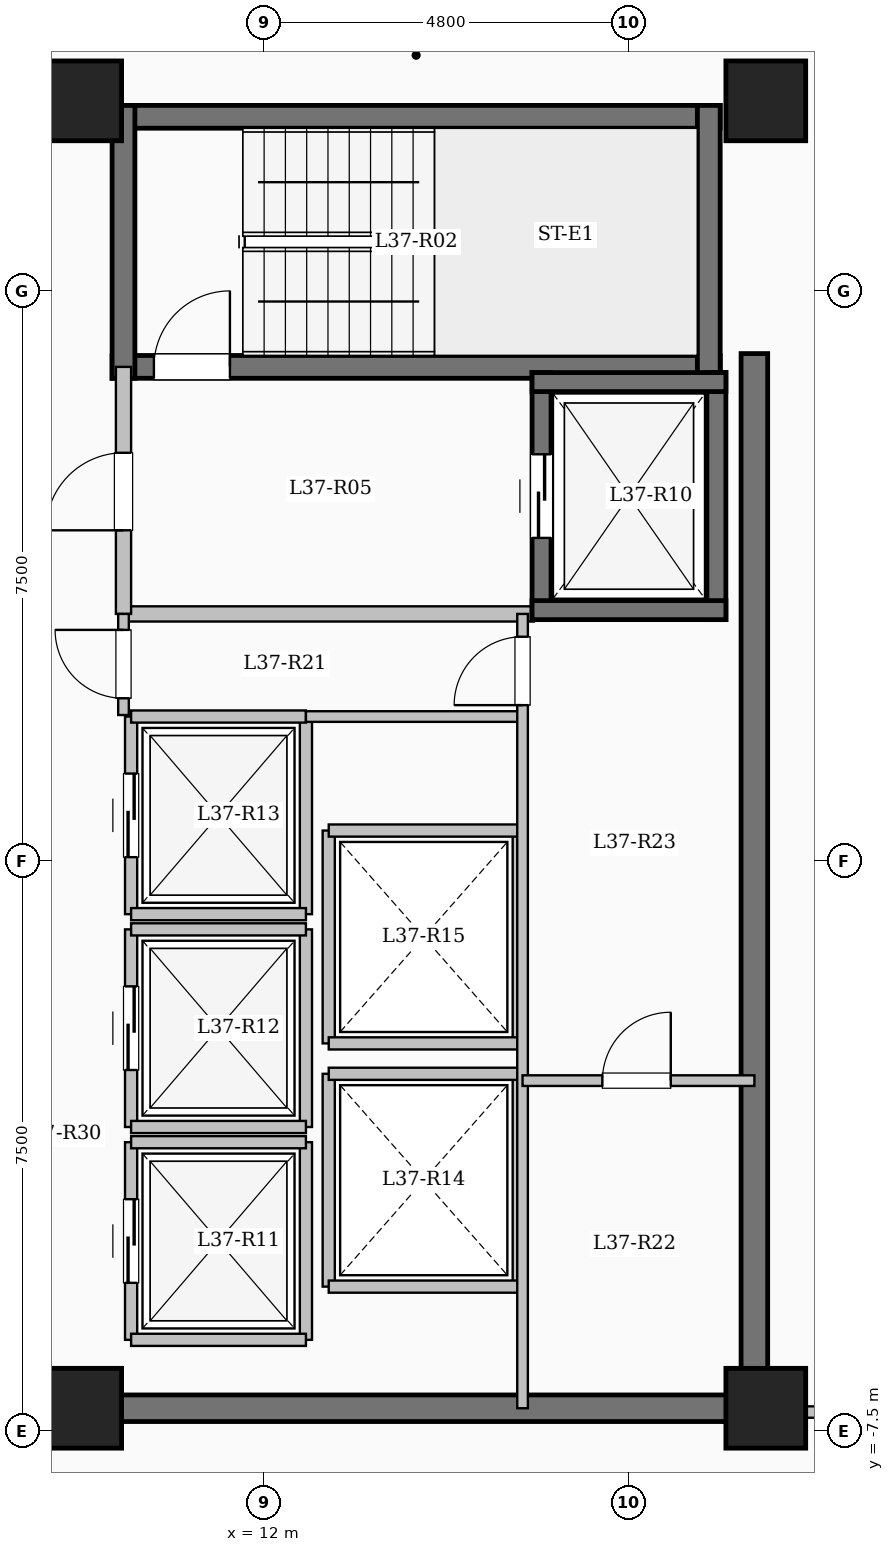
"""IFC4 building model, lengths in metres.
Left out: names, types, materials, properties, quantities, classifications, styles, units other than length and angle.
Written with IfcOpenShell. Run it as: python <this file> out.ifc"""

import sys

from ifc_helpers import new_model, si_unit, direction, frame, frame_2d, origin, origin_2d, place, context, subcontext, project, spatial, rectangle, extrude, element, fill, save


model = new_model("IFC4")
c1 = context("Model", 3, precision=1e-05, world=origin(), true_north=direction((0.0, 1.0)))
c2 = subcontext(c1, "Body", "Model", "MODEL_VIEW")
j1 = project(units=[si_unit("LENGTHUNIT", "METRE"), si_unit("PLANEANGLEUNIT", "RADIAN")], contexts=[c1])
p1 = place(None, origin())
s1 = spatial("IfcSite", under=j1, at=p1, CompositionType="ELEMENT")
p2 = place(p1, origin())
s2 = spatial("IfcBuilding", under=s1, at=p2, CompositionType="ELEMENT")
p3 = place(p2, frame((0.0, 0.0, 139.3)))
s3 = spatial("IfcBuildingStorey", under=s2, at=p3, CompositionType="ELEMENT", Elevation=139.3)
for number, where, z_axis, x_axis in (
    (1, (9.6, -7.2, 0.0), (0.0, 0.0, 1.0), (1.0, 0.0, 0.0)),
    (2, (9.6, 10.0, 0.0), (0.0, 0.0, 1.0), (1.0, 0.0, 0.0)),
    (3, (18.6, -7.2, 0.0), (0.0, 0.0, 1.0), (1.0, 0.0, 0.0)),
    (4, (18.6, 10.0, 0.0), (0.0, 0.0, 1.0), (1.0, 0.0, 0.0)),
):
    element("IfcColumn", number, at=place(p3, frame(where, z_axis=z_axis, x_axis=x_axis)), inside=s3, PredefinedType="COLUMN", context=c2, shape_type="SweptSolid", body=[
        extrude(rectangle(XDim=1.05, YDim=1.05, at=origin_2d()), origin(), (0.0, 0.0, 1.0), 3.35),
    ])
p4 = place(p3, frame((10.0, 9.79, 0.0), z_axis=(0.0, 0.0, 1.0), x_axis=(1.0, 0.0, 0.0)))
e5 = element("IfcWall", 5, at=p4, inside=s3, PredefinedType="SHEAR", context=c2, shape_type="SweptSolid", body=[
    extrude(rectangle(XDim=8.0, YDim=0.3, at=frame_2d((4.0, 0.0))), origin(), (0.0, 0.0, 1.0), 3.35),
])
p5 = place(p3, frame((10.0, 6.5, 0.0), z_axis=(0.0, 0.0, 1.0), x_axis=(1.0, 0.0, 0.0)))
e6 = element("IfcWall", 6, at=p5, inside=s3, PredefinedType="SHEAR", context=c2, shape_type="SweptSolid", body=[
    extrude(rectangle(XDim=8.0, YDim=0.3, at=frame_2d((4.0, 0.0))), origin(), (0.0, 0.0, 1.0), 3.35),
])
p6 = place(p5, frame((0.55, 0.0, 0.0)))
e7 = element("IfcOpeningElement", 7, at=p6, cuts=e6, PredefinedType="OPENING", context=c2, shape_type="SweptSolid", body=[
    extrude(rectangle(XDim=1.0, YDim=2.15, at=frame_2d((0.5, 1.075))), frame((0.0, 0.16, 0.0), z_axis=(0.0, -1.0, 0.0), x_axis=(1.0, 0.0, 0.0)), (0.0, 0.0, 1.0), 0.32),
])
for number, where, z_axis, x_axis in (
    (8, (10.15, 6.35, 0.0), (0.0, 0.0, 1.0), (0.0, 1.0, 0.0)),
    (9, (17.85, 6.35, 0.0), (0.0, 0.0, 1.0), (0.0, 1.0, 0.0)),
):
    element("IfcWall", number, at=place(p3, frame(where, z_axis=z_axis, x_axis=x_axis)), inside=s3, PredefinedType="SHEAR", context=c2, shape_type="SweptSolid", body=[
        extrude(rectangle(XDim=3.59, YDim=0.3, at=frame_2d((1.795, 0.0))), origin(), (0.0, 0.0, 1.0), 3.35),
    ])
p7 = place(p3, frame((10.15, 3.25, 0.0), z_axis=(0.0, 0.0, 1.0), x_axis=(1.0, 0.0, 0.0)))
e10 = element("IfcWall", 10, at=p7, inside=s3, PredefinedType="SOLIDWALL", context=c2, shape_type="SweptSolid", body=[
    extrude(rectangle(XDim=5.4, YDim=0.2, at=frame_2d((2.7, 0.0))), origin(), (0.0, 0.0, 1.0), 3.1),
])
p8 = place(p3, frame((10.15, 3.25, 0.0), z_axis=(0.0, 0.0, 1.0), x_axis=(0.0, 1.0, 0.0)))
e11 = element("IfcWall", 11, at=p8, inside=s3, PredefinedType="SOLIDWALL", context=c2, shape_type="SweptSolid", body=[
    extrude(rectangle(XDim=3.25, YDim=0.2, at=frame_2d((1.625, 0.0))), origin(), (0.0, 0.0, 1.0), 3.1),
])
p9 = place(p8, frame((1.1, 0.0, 0.0)))
e12 = element("IfcOpeningElement", 12, at=p9, cuts=e11, PredefinedType="OPENING", context=c2, shape_type="SweptSolid", body=[
    extrude(rectangle(XDim=1.02, YDim=2.15, at=frame_2d((0.51, 1.075))), frame((0.0, 0.11, 0.0), z_axis=(0.0, -1.0, 0.0), x_axis=(1.0, 0.0, 0.0)), (0.0, 0.0, 1.0), 0.22),
])
p10 = place(p3, frame((15.65, 3.175, 0.0), z_axis=(0.0, 0.0, 1.0), x_axis=(0.0, 1.0, 0.0)))
e13 = element("IfcWall", 13, at=p10, inside=s3, PredefinedType="SHEAR", context=c2, shape_type="SweptSolid", body=[
    extrude(rectangle(XDim=3.25, YDim=0.25, at=frame_2d((1.625, 0.0))), origin(), (0.0, 0.0, 1.0), 3.35),
])
p11 = place(p10, frame((1.075, 0.0, 0.0)))
e14 = element("IfcOpeningElement", 14, at=p11, cuts=e13, PredefinedType="OPENING", context=c2, shape_type="SweptSolid", body=[
    extrude(rectangle(XDim=1.1, YDim=2.15, at=frame_2d((0.55, 1.075))), frame((0.0, 0.135, 0.0), z_axis=(0.0, -1.0, 0.0), x_axis=(1.0, 0.0, 0.0)), (0.0, 0.0, 1.0), 0.27),
])
p12 = place(p3, frame((17.95, 3.175, 0.0), z_axis=(0.0, 0.0, 1.0), x_axis=(0.0, 1.0, 0.0)))
e15 = element("IfcWall", 15, at=p12, inside=s3, PredefinedType="SHEAR", context=c2, shape_type="SweptSolid", body=[
    extrude(rectangle(XDim=3.25, YDim=0.25, at=frame_2d((1.625, 0.0))), origin(), (0.0, 0.0, 1.0), 3.35),
])
for number, where, z_axis, x_axis in (
    (16, (15.525, 3.3, 0.0), (0.0, 0.0, 1.0), (1.0, 0.0, 0.0)),
    (17, (15.525, 6.3, 0.0), (0.0, 0.0, 1.0), (1.0, 0.0, 0.0)),
):
    element("IfcWall", number, at=place(p3, frame(where, z_axis=z_axis, x_axis=x_axis)), inside=s3, PredefinedType="SHEAR", context=c2, shape_type="SweptSolid", body=[
        extrude(rectangle(XDim=2.55, YDim=0.25, at=frame_2d((1.275, 0.0))), origin(), (0.0, 0.0, 1.0), 3.35),
    ])
p13 = place(p3, frame((10.25, -6.3, 0.0), z_axis=(0.0, 0.0, 1.0), x_axis=(0.0, 1.0, 0.0)))
e18 = element("IfcWall", 18, at=p13, inside=s3, PredefinedType="SOLIDWALL", context=c2, shape_type="SweptSolid", body=[
    extrude(rectangle(XDim=2.6, YDim=0.16, at=frame_2d((1.3, 0.0))), origin(), (0.0, 0.0, 1.0), 3.1),
])
p14 = place(p13, frame((0.75, 0.0, 0.0)))
e19 = element("IfcOpeningElement", 19, at=p14, cuts=e18, PredefinedType="OPENING", context=c2, shape_type="SweptSolid", body=[
    extrude(rectangle(XDim=1.1, YDim=2.15, at=frame_2d((0.55, 1.075))), frame((0.0, 0.09, 0.0), z_axis=(0.0, -1.0, 0.0), x_axis=(1.0, 0.0, 0.0)), (0.0, 0.0, 1.0), 0.18),
])
p15 = place(p3, frame((12.55, -6.3, 0.0), z_axis=(0.0, 0.0, 1.0), x_axis=(0.0, 1.0, 0.0)))
e20 = element("IfcWall", 20, at=p15, inside=s3, PredefinedType="SOLIDWALL", context=c2, shape_type="SweptSolid", body=[
    extrude(rectangle(XDim=2.6, YDim=0.16, at=frame_2d((1.3, 0.0))), origin(), (0.0, 0.0, 1.0), 3.1),
])
for number, where, z_axis, x_axis in (
    (21, (10.25, -6.3, 0.0), (0.0, 0.0, 1.0), (1.0, 0.0, 0.0)),
    (22, (10.25, -3.7, 0.0), (0.0, 0.0, 1.0), (1.0, 0.0, 0.0)),
):
    element("IfcWall", number, at=place(p3, frame(where, z_axis=z_axis, x_axis=x_axis)), inside=s3, PredefinedType="SOLIDWALL", context=c2, shape_type="SweptSolid", body=[
        extrude(rectangle(XDim=2.3, YDim=0.16, at=frame_2d((1.15, 0.0))), origin(), (0.0, 0.0, 1.0), 3.1),
    ])
p16 = place(p3, frame((10.25, -3.5, 0.0), z_axis=(0.0, 0.0, 1.0), x_axis=(0.0, 1.0, 0.0)))
e23 = element("IfcWall", 23, at=p16, inside=s3, PredefinedType="SOLIDWALL", context=c2, shape_type="SweptSolid", body=[
    extrude(rectangle(XDim=2.6, YDim=0.16, at=frame_2d((1.3, 0.0))), origin(), (0.0, 0.0, 1.0), 3.1),
])
p17 = place(p16, frame((0.75, 0.0, 0.0)))
e24 = element("IfcOpeningElement", 24, at=p17, cuts=e23, PredefinedType="OPENING", context=c2, shape_type="SweptSolid", body=[
    extrude(rectangle(XDim=1.1, YDim=2.15, at=frame_2d((0.55, 1.075))), frame((0.0, 0.09, 0.0), z_axis=(0.0, -1.0, 0.0), x_axis=(1.0, 0.0, 0.0)), (0.0, 0.0, 1.0), 0.18),
])
p18 = place(p3, frame((12.55, -3.5, 0.0), z_axis=(0.0, 0.0, 1.0), x_axis=(0.0, 1.0, 0.0)))
e25 = element("IfcWall", 25, at=p18, inside=s3, PredefinedType="SOLIDWALL", context=c2, shape_type="SweptSolid", body=[
    extrude(rectangle(XDim=2.6, YDim=0.16, at=frame_2d((1.3, 0.0))), origin(), (0.0, 0.0, 1.0), 3.1),
])
for number, where, z_axis, x_axis in (
    (26, (10.25, -3.5, 0.0), (0.0, 0.0, 1.0), (1.0, 0.0, 0.0)),
    (27, (10.25, -0.9, 0.0), (0.0, 0.0, 1.0), (1.0, 0.0, 0.0)),
):
    element("IfcWall", number, at=place(p3, frame(where, z_axis=z_axis, x_axis=x_axis)), inside=s3, PredefinedType="SOLIDWALL", context=c2, shape_type="SweptSolid", body=[
        extrude(rectangle(XDim=2.3, YDim=0.16, at=frame_2d((1.15, 0.0))), origin(), (0.0, 0.0, 1.0), 3.1),
    ])
p19 = place(p3, frame((10.25, -0.7, 0.0), z_axis=(0.0, 0.0, 1.0), x_axis=(0.0, 1.0, 0.0)))
e28 = element("IfcWall", 28, at=p19, inside=s3, PredefinedType="SOLIDWALL", context=c2, shape_type="SweptSolid", body=[
    extrude(rectangle(XDim=2.6, YDim=0.16, at=frame_2d((1.3, 0.0))), origin(), (0.0, 0.0, 1.0), 3.1),
])
p20 = place(p19, frame((0.75, 0.0, 0.0)))
e29 = element("IfcOpeningElement", 29, at=p20, cuts=e28, PredefinedType="OPENING", context=c2, shape_type="SweptSolid", body=[
    extrude(rectangle(XDim=1.1, YDim=2.15, at=frame_2d((0.55, 1.075))), frame((0.0, 0.09, 0.0), z_axis=(0.0, -1.0, 0.0), x_axis=(1.0, 0.0, 0.0)), (0.0, 0.0, 1.0), 0.18),
])
p21 = place(p3, frame((12.55, -0.7, 0.0), z_axis=(0.0, 0.0, 1.0), x_axis=(0.0, 1.0, 0.0)))
e30 = element("IfcWall", 30, at=p21, inside=s3, PredefinedType="SOLIDWALL", context=c2, shape_type="SweptSolid", body=[
    extrude(rectangle(XDim=2.6, YDim=0.16, at=frame_2d((1.3, 0.0))), origin(), (0.0, 0.0, 1.0), 3.1),
])
for number, where, z_axis, x_axis in (
    (31, (10.25, -0.7, 0.0), (0.0, 0.0, 1.0), (1.0, 0.0, 0.0)),
    (32, (10.25, 1.9, 0.0), (0.0, 0.0, 1.0), (1.0, 0.0, 0.0)),
):
    element("IfcWall", number, at=place(p3, frame(where, z_axis=z_axis, x_axis=x_axis)), inside=s3, PredefinedType="SOLIDWALL", context=c2, shape_type="SweptSolid", body=[
        extrude(rectangle(XDim=2.3, YDim=0.16, at=frame_2d((1.15, 0.0))), origin(), (0.0, 0.0, 1.0), 3.1),
    ])
for number, where, z_axis, x_axis in (
    (33, (12.85, -5.6, 0.0), (0.0, 0.0, 1.0), (0.0, 1.0, 0.0)),
    (34, (15.35, -5.6, 0.0), (0.0, 0.0, 1.0), (0.0, 1.0, 0.0)),
):
    element("IfcWall", number, at=place(p3, frame(where, z_axis=z_axis, x_axis=x_axis)), inside=s3, PredefinedType="SOLIDWALL", context=c2, shape_type="SweptSolid", body=[
        extrude(rectangle(XDim=2.8, YDim=0.16, at=frame_2d((1.4, 0.0))), origin(), (0.0, 0.0, 1.0), 3.1),
    ])
for number, where, z_axis, x_axis in (
    (35, (12.85, -5.6, 0.0), (0.0, 0.0, 1.0), (1.0, 0.0, 0.0)),
    (36, (12.85, -2.8, 0.0), (0.0, 0.0, 1.0), (1.0, 0.0, 0.0)),
):
    element("IfcWall", number, at=place(p3, frame(where, z_axis=z_axis, x_axis=x_axis)), inside=s3, PredefinedType="SOLIDWALL", context=c2, shape_type="SweptSolid", body=[
        extrude(rectangle(XDim=2.5, YDim=0.16, at=frame_2d((1.25, 0.0))), origin(), (0.0, 0.0, 1.0), 3.1),
    ])
for number, where, z_axis, x_axis in (
    (37, (12.85, -2.4, 0.0), (0.0, 0.0, 1.0), (0.0, 1.0, 0.0)),
    (38, (15.35, -2.4, 0.0), (0.0, 0.0, 1.0), (0.0, 1.0, 0.0)),
):
    element("IfcWall", number, at=place(p3, frame(where, z_axis=z_axis, x_axis=x_axis)), inside=s3, PredefinedType="SOLIDWALL", context=c2, shape_type="SweptSolid", body=[
        extrude(rectangle(XDim=2.8, YDim=0.16, at=frame_2d((1.4, 0.0))), origin(), (0.0, 0.0, 1.0), 3.1),
    ])
for number, where, z_axis, x_axis in (
    (39, (12.85, -2.4, 0.0), (0.0, 0.0, 1.0), (1.0, 0.0, 0.0)),
    (40, (12.85, 0.4, 0.0), (0.0, 0.0, 1.0), (1.0, 0.0, 0.0)),
):
    element("IfcWall", number, at=place(p3, frame(where, z_axis=z_axis, x_axis=x_axis)), inside=s3, PredefinedType="SOLIDWALL", context=c2, shape_type="SweptSolid", body=[
        extrude(rectangle(XDim=2.5, YDim=0.16, at=frame_2d((1.25, 0.0))), origin(), (0.0, 0.0, 1.0), 3.1),
    ])
p22 = place(p3, frame((18.45, -7.375, 0.0), z_axis=(0.0, 0.0, 1.0), x_axis=(0.0, 1.0, 0.0)))
e41 = element("IfcWall", 41, at=p22, inside=s3, PredefinedType="SHEAR", context=c2, shape_type="SweptSolid", body=[
    extrude(rectangle(XDim=14.05, YDim=0.35, at=frame_2d((7.025, 0.0))), origin(), (0.0, 0.0, 1.0), 3.35),
])
p23 = place(p3, frame((10.075, -7.2, 0.0), z_axis=(0.0, 0.0, 1.0), x_axis=(1.0, 0.0, 0.0)))
e42 = element("IfcWall", 42, at=p23, inside=s3, PredefinedType="SHEAR", context=c2, shape_type="SweptSolid", body=[
    extrude(rectangle(XDim=8.55, YDim=0.35, at=frame_2d((4.275, 0.0))), origin(), (0.0, 0.0, 1.0), 3.35),
])
p24 = place(p3, frame((12.55, 1.9, 0.0), z_axis=(0.0, 0.0, 1.0), x_axis=(1.0, 0.0, 0.0)))
e43 = element("IfcWall", 43, at=p24, inside=s3, PredefinedType="PARTITIONING", context=c2, shape_type="SweptSolid", body=[
    extrude(rectangle(XDim=2.85, YDim=0.14, at=frame_2d((1.425, 0.0))), origin(), (0.0, 0.0, 1.0), 3.1),
])
p25 = place(p3, frame((10.15, 1.92, 0.0), z_axis=(0.0, 0.0, 1.0), x_axis=(0.0, 1.0, 0.0)))
e44 = element("IfcWall", 44, at=p25, inside=s3, PredefinedType="PARTITIONING", context=c2, shape_type="SweptSolid", body=[
    extrude(rectangle(XDim=1.33, YDim=0.14, at=frame_2d((0.665, 0.0))), origin(), (0.0, 0.0, 1.0), 3.1),
])
p26 = place(p25, frame((0.22, 0.0, 0.0)))
e45 = element("IfcOpeningElement", 45, at=p26, cuts=e44, PredefinedType="OPENING", context=c2, shape_type="SweptSolid", body=[
    extrude(rectangle(XDim=0.9, YDim=2.08, at=frame_2d((0.45, 1.04))), frame((0.0, 0.08, 0.0), z_axis=(0.0, -1.0, 0.0), x_axis=(1.0, 0.0, 0.0)), (0.0, 0.0, 1.0), 0.16),
])
p27 = place(p3, frame((15.4, -7.2, 0.0), z_axis=(0.0, 0.0, 1.0), x_axis=(0.0, 1.0, 0.0)))
e46 = element("IfcWall", 46, at=p27, inside=s3, PredefinedType="PARTITIONING", context=c2, shape_type="SweptSolid", body=[
    extrude(rectangle(XDim=10.45, YDim=0.14, at=frame_2d((5.225, 0.0))), origin(), (0.0, 0.0, 1.0), 3.1),
])
p28 = place(p27, frame((9.25, 0.0, 0.0)))
e47 = element("IfcOpeningElement", 47, at=p28, cuts=e46, PredefinedType="OPENING", context=c2, shape_type="SweptSolid", body=[
    extrude(rectangle(XDim=0.9, YDim=2.08, at=frame_2d((0.45, 1.04))), frame((0.0, 0.08, 0.0), z_axis=(0.0, -1.0, 0.0), x_axis=(1.0, 0.0, 0.0)), (0.0, 0.0, 1.0), 0.16),
])
p29 = place(p3, frame((15.4, -2.89, 0.0), z_axis=(0.0, 0.0, 1.0), x_axis=(1.0, 0.0, 0.0)))
e48 = element("IfcWall", 48, at=p29, inside=s3, PredefinedType="PARTITIONING", context=c2, shape_type="SweptSolid", body=[
    extrude(rectangle(XDim=3.05, YDim=0.14, at=frame_2d((1.525, 0.0))), origin(), (0.0, 0.0, 1.0), 3.1),
])
p30 = place(p29, frame((1.05, 0.0, 0.0)))
e49 = element("IfcOpeningElement", 49, at=p30, cuts=e48, PredefinedType="OPENING", context=c2, shape_type="SweptSolid", body=[
    extrude(rectangle(XDim=0.9, YDim=2.08, at=frame_2d((0.45, 1.04))), frame((0.0, 0.08, 0.0), z_axis=(0.0, -1.0, 0.0), x_axis=(1.0, 0.0, 0.0)), (0.0, 0.0, 1.0), 0.16),
])
p31 = place(p3, frame((18.45, -7.25, 0.0), z_axis=(0.0, 0.0, 1.0), x_axis=(1.0, 0.0, 0.0)))
e50 = element("IfcWall", 50, at=p31, inside=s3, PredefinedType="PARTITIONING", context=c2, shape_type="SweptSolid", body=[
    extrude(rectangle(XDim=6.63, YDim=0.15, at=frame_2d((3.315, 0.0))), origin(), (0.0, 0.0, 1.0), 3.1),
])
p32 = place(p31, frame((1.95, 0.0, 0.0)))
e51 = element("IfcOpeningElement", 51, at=p32, cuts=e50, PredefinedType="OPENING", context=c2, shape_type="SweptSolid", body=[
    extrude(rectangle(XDim=1.08, YDim=2.15, at=frame_2d((0.54, 1.075))), frame((0.0, 0.085, 0.0), z_axis=(0.0, -1.0, 0.0), x_axis=(1.0, 0.0, 0.0)), (0.0, 0.0, 1.0), 0.17),
])
p33 = place(p6, origin())
e52 = element("IfcDoor", 52, at=p33, inside=s3, OperationType="SINGLE_SWING_RIGHT", PredefinedType="DOOR", context=c2, shape_type="SweptSolid", body=[
    extrude(rectangle(XDim=1.0, YDim=2.15, at=frame_2d((0.5, 1.075))), frame((0.0, 0.025, 0.0), z_axis=(0.0, -1.0, 0.0), x_axis=(1.0, 0.0, 0.0)), (0.0, 0.0, 1.0), 0.05),
])
fill(e7, e52)
p34 = place(p9, origin())
e53 = element("IfcDoor", 53, at=p34, inside=s3, OperationType="SINGLE_SWING_LEFT", PredefinedType="DOOR", context=c2, shape_type="SweptSolid", body=[
    extrude(rectangle(XDim=1.02, YDim=2.15, at=frame_2d((0.51, 1.075))), frame((0.0, 0.025, 0.0), z_axis=(0.0, -1.0, 0.0), x_axis=(1.0, 0.0, 0.0)), (0.0, 0.0, 1.0), 0.05),
])
fill(e12, e53)
p35 = place(p11, origin())
e54 = element("IfcDoor", 54, at=p35, inside=s3, OperationType="SLIDING_TO_LEFT", PredefinedType="DOOR", context=c2, shape_type="SweptSolid", body=[
    extrude(rectangle(XDim=1.1, YDim=2.15, at=frame_2d((0.55, 1.075))), frame((0.0, 0.025, 0.0), z_axis=(0.0, -1.0, 0.0), x_axis=(1.0, 0.0, 0.0)), (0.0, 0.0, 1.0), 0.05),
])
fill(e14, e54)
p36 = place(p14, origin())
e55 = element("IfcDoor", 55, at=p36, inside=s3, OperationType="SLIDING_TO_LEFT", PredefinedType="DOOR", context=c2, shape_type="SweptSolid", body=[
    extrude(rectangle(XDim=1.1, YDim=2.15, at=frame_2d((0.55, 1.075))), frame((0.0, 0.025, 0.0), z_axis=(0.0, -1.0, 0.0), x_axis=(1.0, 0.0, 0.0)), (0.0, 0.0, 1.0), 0.05),
])
fill(e19, e55)
p37 = place(p17, origin())
e56 = element("IfcDoor", 56, at=p37, inside=s3, OperationType="SLIDING_TO_LEFT", PredefinedType="DOOR", context=c2, shape_type="SweptSolid", body=[
    extrude(rectangle(XDim=1.1, YDim=2.15, at=frame_2d((0.55, 1.075))), frame((0.0, 0.025, 0.0), z_axis=(0.0, -1.0, 0.0), x_axis=(1.0, 0.0, 0.0)), (0.0, 0.0, 1.0), 0.05),
])
fill(e24, e56)
p38 = place(p20, origin())
e57 = element("IfcDoor", 57, at=p38, inside=s3, OperationType="SLIDING_TO_LEFT", PredefinedType="DOOR", context=c2, shape_type="SweptSolid", body=[
    extrude(rectangle(XDim=1.1, YDim=2.15, at=frame_2d((0.55, 1.075))), frame((0.0, 0.025, 0.0), z_axis=(0.0, -1.0, 0.0), x_axis=(1.0, 0.0, 0.0)), (0.0, 0.0, 1.0), 0.05),
])
fill(e29, e57)
p39 = place(p26, origin())
e58 = element("IfcDoor", 58, at=p39, inside=s3, OperationType="SINGLE_SWING_RIGHT", PredefinedType="DOOR", context=c2, shape_type="SweptSolid", body=[
    extrude(rectangle(XDim=0.9, YDim=2.08, at=frame_2d((0.45, 1.04))), frame((0.0, 0.025, 0.0), z_axis=(0.0, -1.0, 0.0), x_axis=(1.0, 0.0, 0.0)), (0.0, 0.0, 1.0), 0.05),
])
fill(e45, e58)
p40 = place(p28, origin())
e59 = element("IfcDoor", 59, at=p40, inside=s3, OperationType="SINGLE_SWING_LEFT", PredefinedType="DOOR", context=c2, shape_type="SweptSolid", body=[
    extrude(rectangle(XDim=0.9, YDim=2.08, at=frame_2d((0.45, 1.04))), frame((0.0, 0.025, 0.0), z_axis=(0.0, -1.0, 0.0), x_axis=(1.0, 0.0, 0.0)), (0.0, 0.0, 1.0), 0.05),
])
fill(e47, e59)
p41 = place(p30, origin())
e60 = element("IfcDoor", 60, at=p41, inside=s3, OperationType="SINGLE_SWING_RIGHT", PredefinedType="DOOR", context=c2, shape_type="SweptSolid", body=[
    extrude(rectangle(XDim=0.9, YDim=2.08, at=frame_2d((0.45, 1.04))), frame((0.0, 0.025, 0.0), z_axis=(0.0, -1.0, 0.0), x_axis=(1.0, 0.0, 0.0)), (0.0, 0.0, 1.0), 0.05),
])
fill(e49, e60)
save(model, sys.argv[1])
